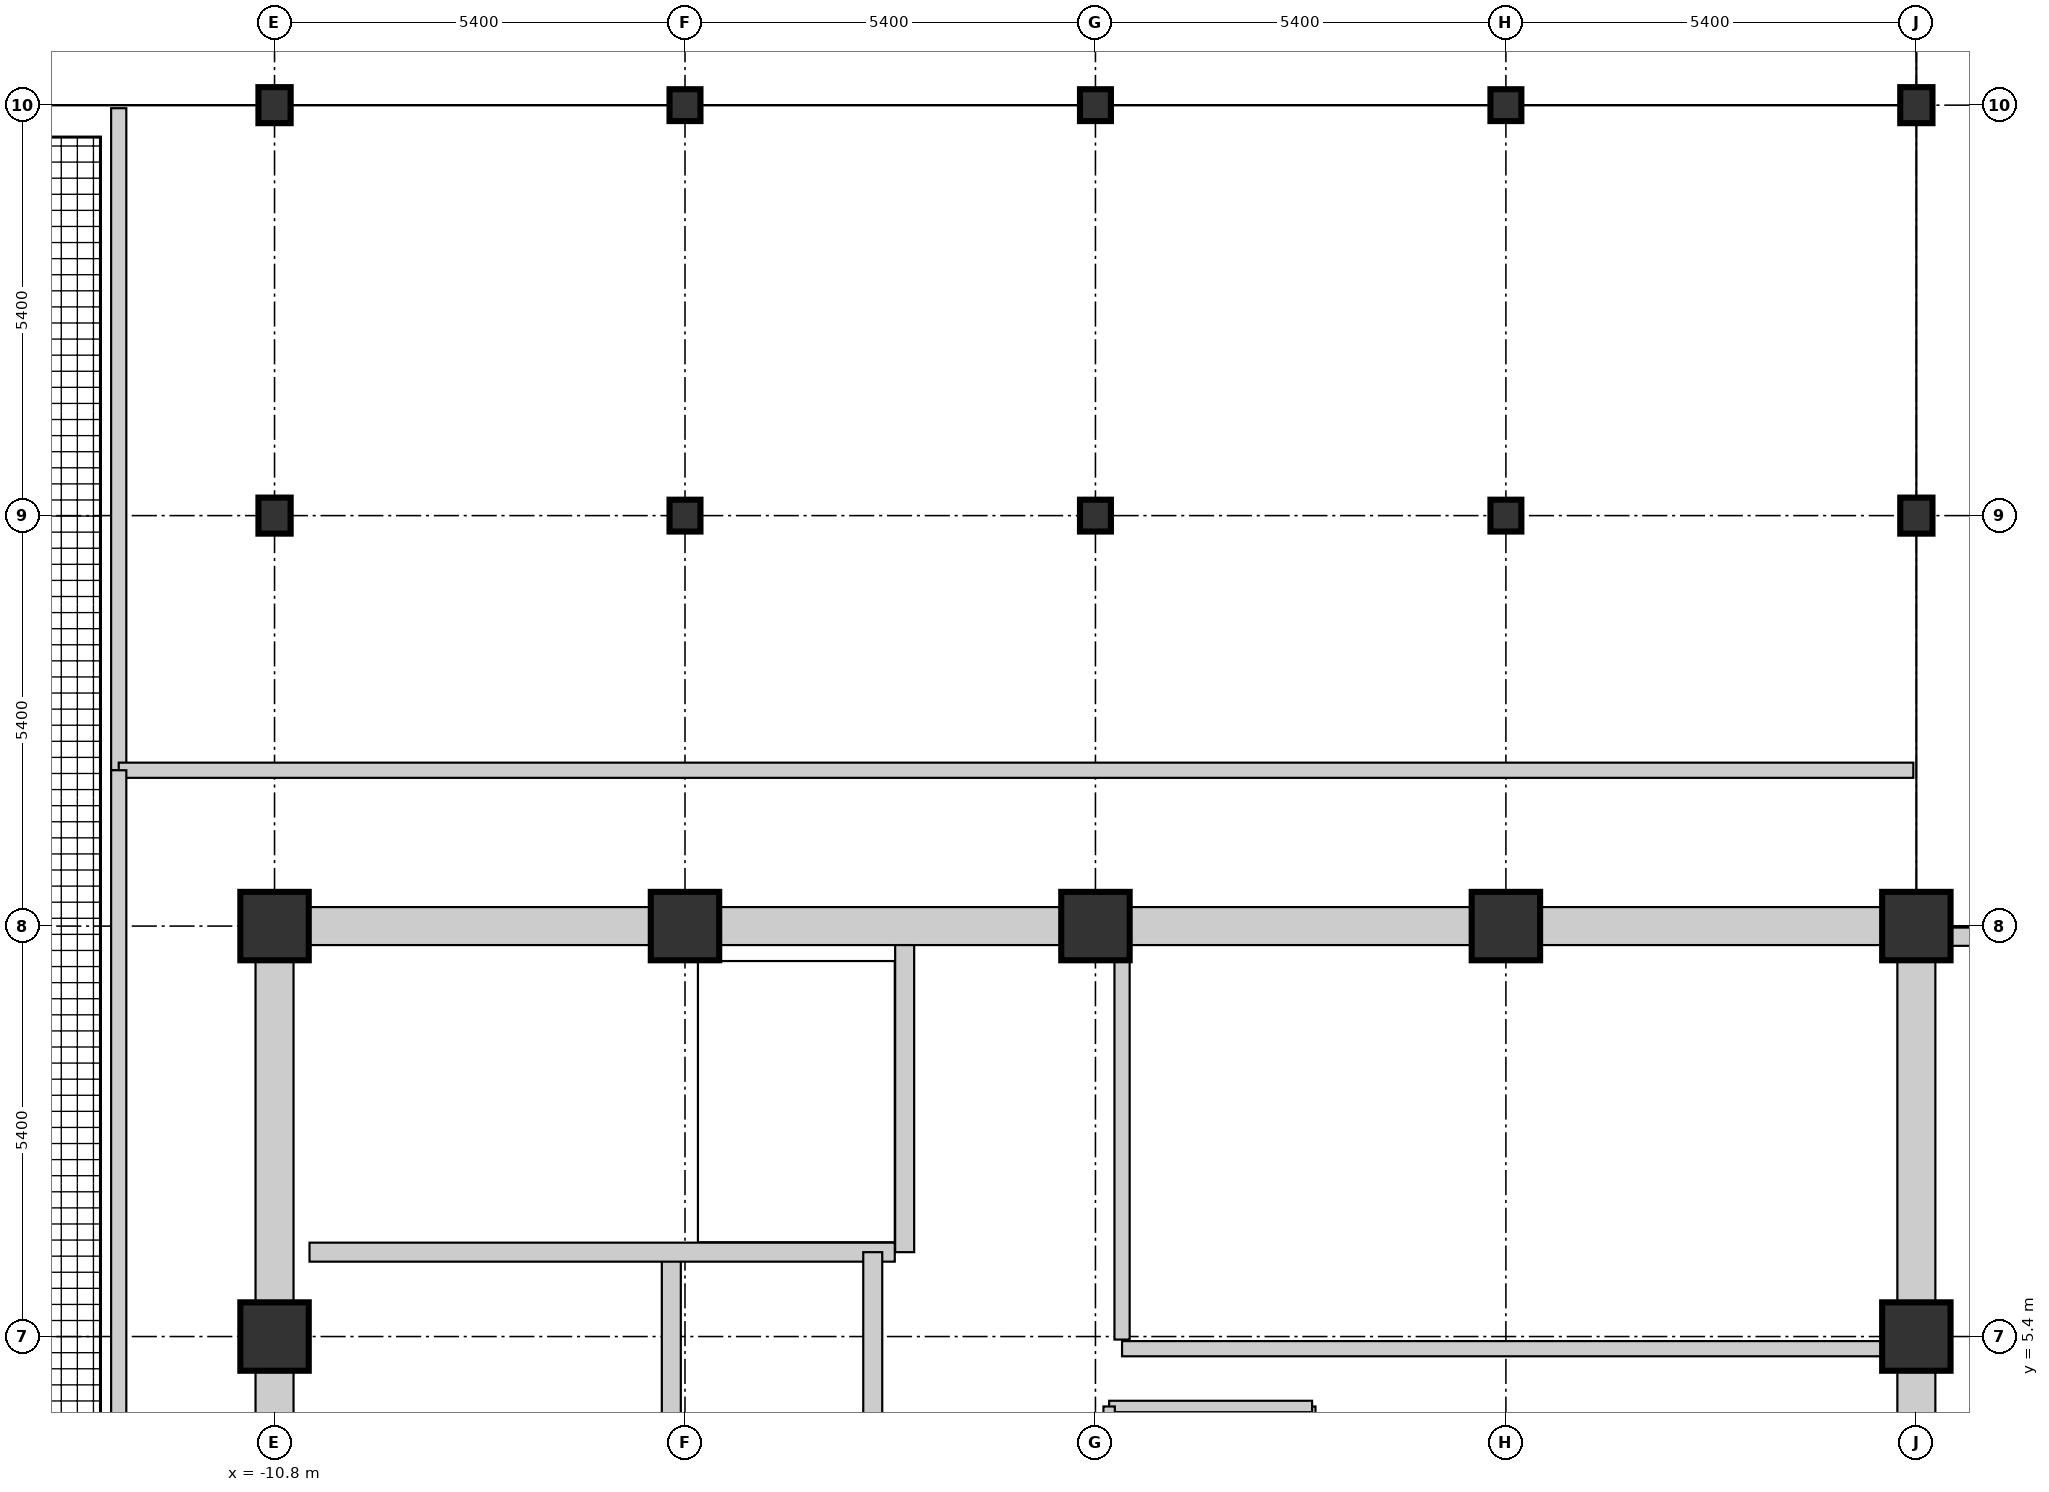
"""IFC4 building model, lengths in metres.
Left out: names, types, materials, properties, quantities, classifications, styles, units other than length and angle.
Written with IfcOpenShell. Run it as: python <this file> out.ifc"""

import sys

from ifc_helpers import new_model, si_unit, direction, frame, frame_2d, origin, origin_2d, place, context, subcontext, project, spatial, rectangle, i_section, extrude, element, fill, save


model = new_model("IFC4")
c1 = context("Model", 3, precision=1e-05, world=origin(), true_north=direction((0.0, 1.0)))
c2 = subcontext(c1, "Body", "Model", "MODEL_VIEW")
j1 = project(units=[si_unit("LENGTHUNIT", "METRE"), si_unit("PLANEANGLEUNIT", "RADIAN")], contexts=[c1])
p1 = place(None, origin())
s1 = spatial("IfcSite", under=j1, at=p1, CompositionType="ELEMENT")
p2 = place(p1, origin())
s2 = spatial("IfcBuilding", under=s1, at=p2, CompositionType="ELEMENT")
p3 = place(p2, frame((0.0, 0.0, 337.5)))
s3 = spatial("IfcBuildingStorey", under=s2, at=p3, CompositionType="ELEMENT", Elevation=337.5)
for number, where, z_axis, x_axis in (
    (1, (-10.8, 5.4, 0.0), (0.0, 0.0, 1.0), (1.0, 0.0, 0.0)),
    (2, (-10.8, 10.8, 0.0), (0.0, 0.0, 1.0), (1.0, 0.0, 0.0)),
):
    element("IfcColumn", number, at=place(p3, frame(where, z_axis=z_axis, x_axis=x_axis)), inside=s3, PredefinedType="COLUMN", context=c2, shape_type="SweptSolid", body=[
        extrude(rectangle(XDim=0.9, YDim=0.9, at=origin_2d()), origin(), (0.0, 0.0, 1.0), 4.5),
    ])
for number, where, z_axis, x_axis in (
    (3, (-10.8, 16.2, 0.0), (0.0, 0.0, 1.0), (1.0, 0.0, 0.0)),
    (4, (-10.8, 21.6, 0.0), (0.0, 0.0, 1.0), (1.0, 0.0, 0.0)),
):
    element("IfcColumn", number, at=place(p3, frame(where, z_axis=z_axis, x_axis=x_axis)), inside=s3, PredefinedType="COLUMN", context=c2, shape_type="SweptSolid", body=[
        extrude(i_section(OverallWidth=0.424, OverallDepth=0.474, WebThickness=0.043, FlangeThickness=0.065, at=origin_2d()), origin(), (0.0, 0.0, 1.0), 4.5),
    ])
p4 = place(p3, frame((-5.4, 10.8, 0.0), z_axis=(0.0, 0.0, 1.0), x_axis=(1.0, 0.0, 0.0)))
e5 = element("IfcColumn", 5, at=p4, inside=s3, PredefinedType="COLUMN", context=c2, shape_type="SweptSolid", body=[
    extrude(rectangle(XDim=0.9, YDim=0.9, at=origin_2d()), origin(), (0.0, 0.0, 1.0), 4.5),
])
for number, where, z_axis, x_axis in (
    (6, (-5.4, 16.2, 0.0), (0.0, 0.0, 1.0), (1.0, 0.0, 0.0)),
    (7, (-5.4, 21.6, 0.0), (0.0, 0.0, 1.0), (1.0, 0.0, 0.0)),
):
    element("IfcColumn", number, at=place(p3, frame(where, z_axis=z_axis, x_axis=x_axis)), inside=s3, PredefinedType="COLUMN", context=c2, shape_type="SweptSolid", body=[
        extrude(i_section(OverallWidth=0.407, OverallDepth=0.419, WebThickness=0.031, FlangeThickness=0.049, at=origin_2d()), origin(), (0.0, 0.0, 1.0), 4.5),
    ])
p5 = place(p3, frame((0.0, 10.8, 0.0), z_axis=(0.0, 0.0, 1.0), x_axis=(1.0, 0.0, 0.0)))
e8 = element("IfcColumn", 8, at=p5, inside=s3, PredefinedType="COLUMN", context=c2, shape_type="SweptSolid", body=[
    extrude(rectangle(XDim=0.9, YDim=0.9, at=origin_2d()), origin(), (0.0, 0.0, 1.0), 4.5),
])
for number, where, z_axis, x_axis in (
    (9, (0.0, 16.2, 0.0), (0.0, 0.0, 1.0), (1.0, 0.0, 0.0)),
    (10, (0.0, 21.6, 0.0), (0.0, 0.0, 1.0), (1.0, 0.0, 0.0)),
):
    element("IfcColumn", number, at=place(p3, frame(where, z_axis=z_axis, x_axis=x_axis)), inside=s3, PredefinedType="COLUMN", context=c2, shape_type="SweptSolid", body=[
        extrude(i_section(OverallWidth=0.407, OverallDepth=0.419, WebThickness=0.031, FlangeThickness=0.049, at=origin_2d()), origin(), (0.0, 0.0, 1.0), 4.5),
    ])
p6 = place(p3, frame((5.4, 10.8, 0.0), z_axis=(0.0, 0.0, 1.0), x_axis=(1.0, 0.0, 0.0)))
e11 = element("IfcColumn", 11, at=p6, inside=s3, PredefinedType="COLUMN", context=c2, shape_type="SweptSolid", body=[
    extrude(rectangle(XDim=0.9, YDim=0.9, at=origin_2d()), origin(), (0.0, 0.0, 1.0), 4.5),
])
for number, where, z_axis, x_axis in (
    (12, (5.4, 16.2, 0.0), (0.0, 0.0, 1.0), (1.0, 0.0, 0.0)),
    (13, (5.4, 21.6, 0.0), (0.0, 0.0, 1.0), (1.0, 0.0, 0.0)),
):
    element("IfcColumn", number, at=place(p3, frame(where, z_axis=z_axis, x_axis=x_axis)), inside=s3, PredefinedType="COLUMN", context=c2, shape_type="SweptSolid", body=[
        extrude(i_section(OverallWidth=0.407, OverallDepth=0.419, WebThickness=0.031, FlangeThickness=0.049, at=origin_2d()), origin(), (0.0, 0.0, 1.0), 4.5),
    ])
for number, where, z_axis, x_axis in (
    (14, (10.8, 5.4, 0.0), (0.0, 0.0, 1.0), (1.0, 0.0, 0.0)),
    (15, (10.8, 10.8, 0.0), (0.0, 0.0, 1.0), (1.0, 0.0, 0.0)),
):
    element("IfcColumn", number, at=place(p3, frame(where, z_axis=z_axis, x_axis=x_axis)), inside=s3, PredefinedType="COLUMN", context=c2, shape_type="SweptSolid", body=[
        extrude(rectangle(XDim=0.9, YDim=0.9, at=origin_2d()), origin(), (0.0, 0.0, 1.0), 4.5),
    ])
for number, where, z_axis, x_axis in (
    (16, (10.8, 16.2, 0.0), (0.0, 0.0, 1.0), (1.0, 0.0, 0.0)),
    (17, (10.8, 21.6, 0.0), (0.0, 0.0, 1.0), (1.0, 0.0, 0.0)),
):
    element("IfcColumn", number, at=place(p3, frame(where, z_axis=z_axis, x_axis=x_axis)), inside=s3, PredefinedType="COLUMN", context=c2, shape_type="SweptSolid", body=[
        extrude(i_section(OverallWidth=0.424, OverallDepth=0.474, WebThickness=0.043, FlangeThickness=0.065, at=origin_2d()), origin(), (0.0, 0.0, 1.0), 4.5),
    ])
p7 = place(p3, frame((-10.34, 10.8, 0.0), z_axis=(0.0, 0.0, 1.0), x_axis=(1.0, 0.0, 0.0)))
e18 = element("IfcWall", 18, at=p7, inside=s3, PredefinedType="SHEAR", context=c2, shape_type="SweptSolid", body=[
    extrude(rectangle(XDim=4.48, YDim=0.5, at=frame_2d((2.24, 0.0))), origin(), (0.0, 0.0, 1.0), 4.5),
])
p8 = place(p3, frame((-4.94, 10.8, 0.0), z_axis=(0.0, 0.0, 1.0), x_axis=(1.0, 0.0, 0.0)))
e19 = element("IfcWall", 19, at=p8, inside=s3, PredefinedType="SHEAR", context=c2, shape_type="SweptSolid", body=[
    extrude(rectangle(XDim=4.48, YDim=0.5, at=frame_2d((2.24, 0.0))), origin(), (0.0, 0.0, 1.0), 4.5),
])
p9 = place(p8, frame((3.13, 0.0, 0.0)))
e20 = element("IfcOpeningElement", 20, at=p9, cuts=e19, PredefinedType="OPENING", context=c2, shape_type="SweptSolid", body=[
    extrude(rectangle(XDim=1.1, YDim=2.1, at=frame_2d((0.55, 1.05))), frame((0.0, 0.26, 0.0), z_axis=(0.0, -1.0, 0.0), x_axis=(1.0, 0.0, 0.0)), (0.0, 0.0, 1.0), 0.52),
])
p10 = place(p3, frame((0.46, 10.8, 0.0), z_axis=(0.0, 0.0, 1.0), x_axis=(1.0, 0.0, 0.0)))
e21 = element("IfcWall", 21, at=p10, inside=s3, PredefinedType="SHEAR", context=c2, shape_type="SweptSolid", body=[
    extrude(rectangle(XDim=4.48, YDim=0.5, at=frame_2d((2.24, 0.0))), origin(), (0.0, 0.0, 1.0), 4.5),
])
p11 = place(p3, frame((-10.8, 0.46, 0.0), z_axis=(0.0, 0.0, 1.0), x_axis=(0.0, 1.0, 0.0)))
e22 = element("IfcWall", 22, at=p11, inside=s3, PredefinedType="SHEAR", context=c2, shape_type="SweptSolid", body=[
    extrude(rectangle(XDim=4.48, YDim=0.5, at=frame_2d((2.24, 0.0))), origin(), (0.0, 0.0, 1.0), 4.5),
])
p12 = place(p11, frame((1.69, 0.0, 0.0)))
e23 = element("IfcOpeningElement", 23, at=p12, cuts=e22, PredefinedType="OPENING", context=c2, shape_type="SweptSolid", body=[
    extrude(rectangle(XDim=1.1, YDim=2.1, at=frame_2d((0.55, 1.05))), frame((0.0, 0.26, 0.0), z_axis=(0.0, -1.0, 0.0), x_axis=(1.0, 0.0, 0.0)), (0.0, 0.0, 1.0), 0.52),
])
for number, where, z_axis, x_axis in (
    (24, (10.8, 0.46, 0.0), (0.0, 0.0, 1.0), (0.0, 1.0, 0.0)),
    (25, (5.86, 10.8, 0.0), (0.0, 0.0, 1.0), (1.0, 0.0, 0.0)),
    (26, (-10.8, 5.86, 0.0), (0.0, 0.0, 1.0), (0.0, 1.0, 0.0)),
    (27, (10.8, 5.86, 0.0), (0.0, 0.0, 1.0), (0.0, 1.0, 0.0)),
):
    element("IfcWall", number, at=place(p3, frame(where, z_axis=z_axis, x_axis=x_axis)), inside=s3, PredefinedType="SHEAR", context=c2, shape_type="SweptSolid", body=[
        extrude(rectangle(XDim=4.48, YDim=0.5, at=frame_2d((2.24, 0.0))), origin(), (0.0, 0.0, 1.0), 4.5),
    ])
p13 = place(p3, frame((11.254, 10.66, 0.0), z_axis=(0.0, 0.0, 1.0), x_axis=(1.0, 0.0, 0.0)))
e28 = element("IfcWall", 28, at=p13, inside=s3, PredefinedType="STANDARD", context=c2, shape_type="SweptSolid", body=[
    extrude(rectangle(XDim=0.606, YDim=0.24, at=frame_2d((0.303, 0.0))), origin(), (0.0, 0.0, 1.0), 3.507),
])
p14 = place(p3, frame((-5.58, 0.72, 0.0), z_axis=(0.0, 0.0, 1.0), x_axis=(0.0, 1.0, 0.0)))
e29 = element("IfcWall", 29, at=p14, inside=s3, PredefinedType="SHEAR", context=c2, shape_type="SweptSolid", body=[
    extrude(rectangle(XDim=5.79, YDim=0.25, at=frame_2d((2.895, 0.0))), origin(), (0.0, 0.0, 1.0), 4.5),
])
p15 = place(p14, frame((3.35, 0.0, 0.0)))
e30 = element("IfcOpeningElement", 30, at=p15, cuts=e29, PredefinedType="OPENING", context=c2, shape_type="SweptSolid", body=[
    extrude(rectangle(XDim=1.1, YDim=2.1, at=frame_2d((0.55, 1.05))), frame((0.0, 0.135, 0.0), z_axis=(0.0, -1.0, 0.0), x_axis=(1.0, 0.0, 0.0)), (0.0, 0.0, 1.0), 0.27),
])
p16 = place(p3, frame((-2.51, 6.51, 0.0), z_axis=(0.0, 0.0, 1.0), x_axis=(0.0, 1.0, 0.0)))
e31 = element("IfcWall", 31, at=p16, inside=s3, PredefinedType="SHEAR", context=c2, shape_type="SweptSolid", body=[
    extrude(rectangle(XDim=4.04, YDim=0.25, at=frame_2d((2.02, 0.0))), origin(), (0.0, 0.0, 1.0), 4.5),
])
p17 = place(p3, frame((-10.34, 6.51, 0.0), z_axis=(0.0, 0.0, 1.0), x_axis=(1.0, 0.0, 0.0)))
e32 = element("IfcWall", 32, at=p17, inside=s3, PredefinedType="SHEAR", context=c2, shape_type="SweptSolid", body=[
    extrude(rectangle(XDim=7.7, YDim=0.25, at=frame_2d((3.85, 0.0))), origin(), (0.0, 0.0, 1.0), 4.5),
])
p18 = place(p17, frame((0.35, 0.0, 0.0)))
e33 = element("IfcOpeningElement", 33, at=p18, cuts=e32, PredefinedType="OPENING", context=c2, shape_type="SweptSolid", body=[
    extrude(rectangle(XDim=1.1, YDim=2.1, at=frame_2d((0.55, 1.05))), frame((0.0, 0.135, 0.0), z_axis=(0.0, -1.0, 0.0), x_axis=(1.0, 0.0, 0.0)), (0.0, 0.0, 1.0), 0.27),
])
p19 = place(p3, frame((-2.93, 0.68, 0.0), z_axis=(0.0, 0.0, 1.0), x_axis=(0.0, 1.0, 0.0)))
e34 = element("IfcWall", 34, at=p19, inside=s3, PredefinedType="SHEAR", context=c2, shape_type="SweptSolid", body=[
    extrude(rectangle(XDim=5.83, YDim=0.25, at=frame_2d((2.915, 0.0))), origin(), (0.0, 0.0, 1.0), 4.5),
])
p20 = place(p19, frame((0.75, 0.0, 0.0)))
e35 = element("IfcOpeningElement", 35, at=p20, cuts=e34, PredefinedType="OPENING", context=c2, shape_type="SweptSolid", body=[
    extrude(rectangle(XDim=1.2, YDim=2.1, at=frame_2d((0.6, 1.05))), frame((0.0, 0.135, 0.0), z_axis=(0.0, -1.0, 0.0), x_axis=(1.0, 0.0, 0.0)), (0.0, 0.0, 1.0), 0.27),
])
p21 = place(p3, frame((2.82, 1.52, 0.0), z_axis=(0.0, 0.0, 1.0), x_axis=(0.0, 1.0, 0.0)))
e36 = element("IfcWall", 36, at=p21, inside=s3, PredefinedType="PARTITIONING", context=c2, shape_type="SweptSolid", body=[
    extrude(rectangle(XDim=2.96, YDim=0.15, at=frame_2d((1.48, 0.0))), origin(), (0.0, 0.0, 1.0), 4.22),
])
p22 = place(p3, frame((0.18, 4.48, 0.0), z_axis=(0.0, 0.0, 1.0), x_axis=(1.0, 0.0, 0.0)))
e37 = element("IfcWall", 37, at=p22, inside=s3, PredefinedType="PARTITIONING", context=c2, shape_type="SweptSolid", body=[
    extrude(rectangle(XDim=2.67, YDim=0.15, at=frame_2d((1.335, 0.0))), origin(), (0.0, 0.0, 1.0), 4.22),
])
p23 = place(p3, frame((0.18, 1.52, 0.0), z_axis=(0.0, 0.0, 1.0), x_axis=(0.0, 1.0, 0.0)))
e38 = element("IfcWall", 38, at=p23, inside=s3, PredefinedType="PARTITIONING", context=c2, shape_type="SweptSolid", body=[
    extrude(rectangle(XDim=2.96, YDim=0.15, at=frame_2d((1.48, 0.0))), origin(), (0.0, 0.0, 1.0), 4.22),
])
p24 = place(p23, frame((0.95, 0.0, 0.0)))
e39 = element("IfcOpeningElement", 39, at=p24, cuts=e38, PredefinedType="OPENING", context=c2, shape_type="SweptSolid", body=[
    extrude(rectangle(XDim=0.85, YDim=2.1, at=frame_2d((0.425, 1.05))), frame((0.0, 0.085, 0.0), z_axis=(0.0, -1.0, 0.0), x_axis=(1.0, 0.0, 0.0)), (0.0, 0.0, 1.0), 0.17),
])
p25 = place(p3, frame((0.35, 5.24, 0.0), z_axis=(0.0, 0.0, 1.0), x_axis=(1.0, 0.0, 0.0)))
e40 = element("IfcWall", 40, at=p25, inside=s3, PredefinedType="PARTITIONING", context=c2, shape_type="SweptSolid", body=[
    extrude(rectangle(XDim=9.99, YDim=0.2, at=frame_2d((4.995, 0.0))), origin(), (0.0, 0.0, 1.0), 4.22),
])
p26 = place(p25, frame((0.8, 0.0, 0.0)))
e41 = element("IfcOpeningElement", 41, at=p26, cuts=e40, PredefinedType="OPENING", context=c2, shape_type="SweptSolid", body=[
    extrude(rectangle(XDim=1.1, YDim=2.1, at=frame_2d((0.55, 1.05))), frame((0.0, 0.11, 0.0), z_axis=(0.0, -1.0, 0.0), x_axis=(1.0, 0.0, 0.0)), (0.0, 0.0, 1.0), 0.22),
])
p27 = place(p3, frame((0.35, 5.36, 0.0), z_axis=(0.0, 0.0, 1.0), x_axis=(0.0, 1.0, 0.0)))
e42 = element("IfcWall", 42, at=p27, inside=s3, PredefinedType="PARTITIONING", context=c2, shape_type="SweptSolid", body=[
    extrude(rectangle(XDim=4.98, YDim=0.2, at=frame_2d((2.49, 0.0))), origin(), (0.0, 0.0, 1.0), 4.22),
])
p28 = place(p3, frame((-12.85, 12.85, 0.0), z_axis=(0.0, 0.0, 1.0), x_axis=(0.0, 1.0, 0.0)))
e43 = element("IfcWall", 43, at=p28, inside=s3, PredefinedType="PARTITIONING", context=c2, shape_type="SweptSolid", body=[
    extrude(rectangle(XDim=8.71, YDim=0.2, at=frame_2d((4.355, 0.0))), origin(), (0.0, 0.0, 1.0), 3.507),
])
p29 = place(p3, frame((-12.85, 12.85, 0.0), z_axis=(0.0, 0.0, 1.0), x_axis=(1.0, 0.0, 0.0)))
e44 = element("IfcWall", 44, at=p29, inside=s3, PredefinedType="PARTITIONING", context=c2, shape_type="SweptSolid", body=[
    extrude(rectangle(XDim=23.61, YDim=0.2, at=frame_2d((11.805, 0.0))), origin(), (0.0, 0.0, 1.0), 3.507),
])
p30 = place(p29, frame((9.5, 0.0, 0.0)))
e45 = element("IfcOpeningElement", 45, at=p30, cuts=e44, PredefinedType="OPENING", context=c2, shape_type="SweptSolid", body=[
    extrude(rectangle(XDim=1.1, YDim=2.1, at=frame_2d((0.55, 1.05))), frame((0.0, 0.11, 0.0), z_axis=(0.0, -1.0, 0.0), x_axis=(1.0, 0.0, 0.0)), (0.0, 0.0, 1.0), 0.22),
])
p31 = place(p3, frame((-12.85, -12.85, 0.0), z_axis=(0.0, 0.0, 1.0), x_axis=(0.0, 1.0, 0.0)))
e46 = element("IfcWall", 46, at=p31, inside=s3, PredefinedType="PARTITIONING", context=c2, shape_type="SweptSolid", body=[
    extrude(rectangle(XDim=25.7, YDim=0.2, at=frame_2d((12.85, 0.0))), origin(), (0.0, 0.0, 1.0), 3.663),
])
p32 = place(p31, frame((16.5, 0.0, 0.0)))
e47 = element("IfcOpeningElement", 47, at=p32, cuts=e46, PredefinedType="OPENING", context=c2, shape_type="SweptSolid", body=[
    extrude(rectangle(XDim=1.1, YDim=2.1, at=frame_2d((0.55, 1.05))), frame((0.0, 0.11, 0.0), z_axis=(0.0, -1.0, 0.0), x_axis=(1.0, 0.0, 0.0)), (0.0, 0.0, 1.0), 0.22),
])
p33 = place(p31, frame((3.2, 0.0, 0.0)))
e48 = element("IfcOpeningElement", 48, at=p33, cuts=e46, PredefinedType="OPENING", context=c2, shape_type="SweptSolid", body=[
    extrude(rectangle(XDim=1.1, YDim=2.1, at=frame_2d((0.55, 1.05))), frame((0.0, 0.11, 0.0), z_axis=(0.0, -1.0, 0.0), x_axis=(1.0, 0.0, 0.0)), (0.0, 0.0, 1.0), 0.22),
])
p34 = place(p18, origin())
e49 = element("IfcDoor", 49, at=p34, inside=s3, OperationType="SINGLE_SWING_LEFT", PredefinedType="DOOR", context=c2, shape_type="SweptSolid", body=[
    extrude(rectangle(XDim=1.1, YDim=2.1, at=frame_2d((0.55, 1.05))), frame((0.0, 0.025, 0.0), z_axis=(0.0, -1.0, 0.0), x_axis=(1.0, 0.0, 0.0)), (0.0, 0.0, 1.0), 0.05),
])
fill(e33, e49)
p35 = place(p9, origin())
e50 = element("IfcDoor", 50, at=p35, inside=s3, OperationType="SINGLE_SWING_LEFT", PredefinedType="DOOR", context=c2, shape_type="SweptSolid", body=[
    extrude(rectangle(XDim=1.1, YDim=2.1, at=frame_2d((0.55, 1.05))), frame((0.0, 0.025, 0.0), z_axis=(0.0, -1.0, 0.0), x_axis=(1.0, 0.0, 0.0)), (0.0, 0.0, 1.0), 0.05),
])
fill(e20, e50)
p36 = place(p15, origin())
e51 = element("IfcDoor", 51, at=p36, inside=s3, OperationType="SLIDING_TO_LEFT", PredefinedType="DOOR", context=c2, shape_type="SweptSolid", body=[
    extrude(rectangle(XDim=1.1, YDim=2.1, at=frame_2d((0.55, 1.05))), frame((0.0, 0.025, 0.0), z_axis=(0.0, -1.0, 0.0), x_axis=(1.0, 0.0, 0.0)), (0.0, 0.0, 1.0), 0.05),
])
fill(e30, e51)
p37 = place(p26, origin())
e52 = element("IfcDoor", 52, at=p37, inside=s3, OperationType="SINGLE_SWING_LEFT", PredefinedType="DOOR", context=c2, shape_type="SweptSolid", body=[
    extrude(rectangle(XDim=1.1, YDim=2.1, at=frame_2d((0.55, 1.05))), frame((0.0, 0.025, 0.0), z_axis=(0.0, -1.0, 0.0), x_axis=(1.0, 0.0, 0.0)), (0.0, 0.0, 1.0), 0.05),
])
fill(e41, e52)
p38 = place(p32, origin())
e53 = element("IfcDoor", 53, at=p38, inside=s3, OperationType="SINGLE_SWING_RIGHT", PredefinedType="DOOR", context=c2, shape_type="SweptSolid", body=[
    extrude(rectangle(XDim=1.1, YDim=2.1, at=frame_2d((0.55, 1.05))), frame((0.0, 0.025, 0.0), z_axis=(0.0, -1.0, 0.0), x_axis=(1.0, 0.0, 0.0)), (0.0, 0.0, 1.0), 0.05),
])
fill(e47, e53)
p39 = place(p30, origin())
e54 = element("IfcDoor", 54, at=p39, inside=s3, OperationType="SINGLE_SWING_RIGHT", PredefinedType="DOOR", context=c2, shape_type="SweptSolid", body=[
    extrude(rectangle(XDim=1.1, YDim=2.1, at=frame_2d((0.55, 1.05))), frame((0.0, 0.025, 0.0), z_axis=(0.0, -1.0, 0.0), x_axis=(1.0, 0.0, 0.0)), (0.0, 0.0, 1.0), 0.05),
])
fill(e45, e54)
save(model, sys.argv[1])
